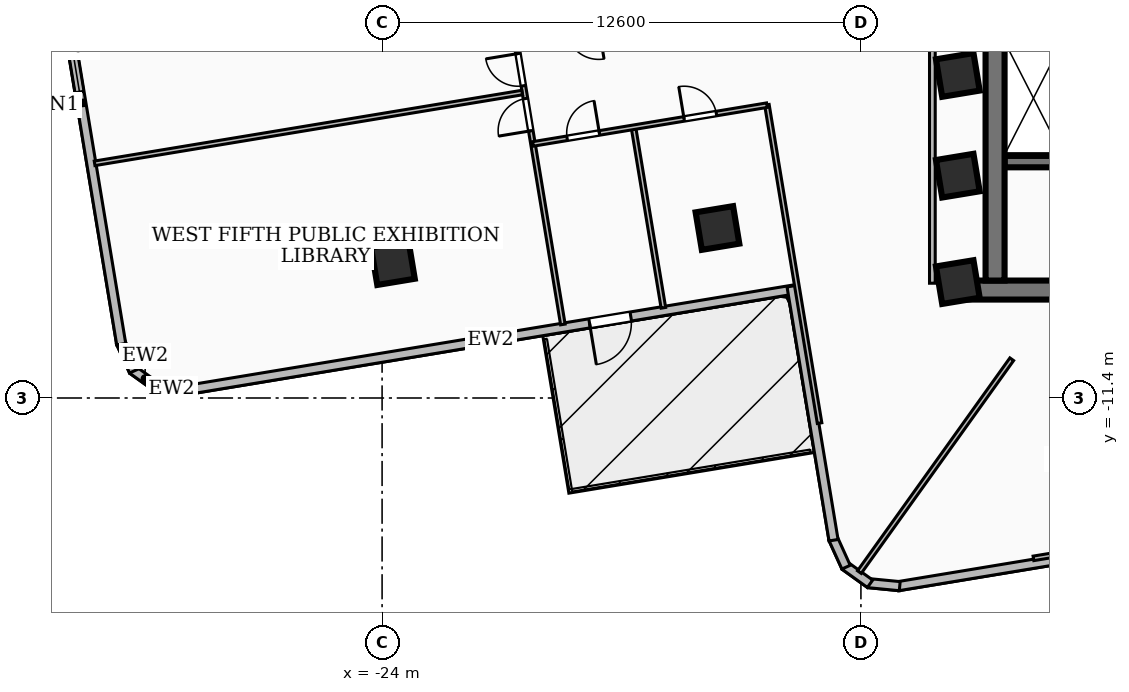
"""IFC4 building model, lengths in metres.
Left out: names, types, materials, properties, quantities, classifications, styles, units other than length and angle.
Written with IfcOpenShell. Run it as: python <this file> out.ifc"""

import sys

from ifc_helpers import new_model, si_unit, direction, frame, frame_2d, origin, origin_2d, place, context, subcontext, project, spatial, rectangle, extrude, element, fill, save


model = new_model("IFC4")
c1 = context("Model", 3, precision=1e-05, world=origin(), true_north=direction((0.0, 1.0)))
c2 = subcontext(c1, "Body", "Model", "MODEL_VIEW")
j1 = project(units=[si_unit("LENGTHUNIT", "METRE"), si_unit("PLANEANGLEUNIT", "RADIAN")], contexts=[c1])
p1 = place(None, origin())
s1 = spatial("IfcSite", under=j1, at=p1, CompositionType="ELEMENT")
p2 = place(p1, origin())
s2 = spatial("IfcBuilding", under=s1, at=p2, CompositionType="ELEMENT")
p3 = place(p2, frame((0.0, 0.0, 92.88)))
s3 = spatial("IfcBuildingStorey", under=s2, at=p3, CompositionType="ELEMENT", Elevation=92.88)
p4 = place(p3, frame((8.78, -8.56, 0.0), z_axis=(0.0, 0.0, 1.0), x_axis=(-1.0, 0.0, 0.0)))
e1 = element("IfcWall", 1, at=p4, inside=s3, PredefinedType="SHEAR", context=c2, shape_type="SweptSolid", body=[
    extrude(rectangle(XDim=17.56, YDim=0.5, at=frame_2d((8.78, 0.0))), origin(), (0.0, 0.0, 1.0), 3.34),
])
p5 = place(p3, frame((-7.87, -8.31, 0.0), z_axis=(0.0, 0.0, 1.0), x_axis=(0.0, 1.0, 0.0)))
e2 = element("IfcWall", 2, at=p5, inside=s3, PredefinedType="SHEAR", context=c2, shape_type="SweptSolid", body=[
    extrude(rectangle(XDim=6.31, YDim=0.5, at=frame_2d((3.155, 0.0))), origin(), (0.0, 0.0, 1.0), 3.34),
])
p6 = place(p3, frame((-7.62, -5.18, 0.0), z_axis=(0.0, 0.0, 1.0), x_axis=(1.0, 0.0, 0.0)))
e3 = element("IfcWall", 3, at=p6, inside=s3, PredefinedType="SOLIDWALL", context=c2, shape_type="SweptSolid", body=[
    extrude(rectangle(XDim=15.24, YDim=0.3, at=frame_2d((7.62, 0.0))), origin(), (0.0, 0.0, 1.0), 3.34),
])
p7 = place(p6, frame((5.77, 0.0, 0.0)))
e4 = element("IfcOpeningElement", 4, at=p7, cuts=e3, PredefinedType="OPENING", context=c2, shape_type="SweptSolid", body=[
    extrude(rectangle(XDim=1.1, YDim=2.15, at=frame_2d((0.55, 1.075))), frame((0.0, 0.16, 0.0), z_axis=(0.0, -1.0, 0.0), x_axis=(1.0, 0.0, 0.0)), (0.0, 0.0, 1.0), 0.32),
])
p8 = place(p6, frame((7.97, 0.0, 0.0)))
e5 = element("IfcOpeningElement", 5, at=p8, cuts=e3, PredefinedType="OPENING", context=c2, shape_type="SweptSolid", body=[
    extrude(rectangle(XDim=1.0, YDim=2.1, at=frame_2d((0.5, 1.05))), frame((0.0, 0.16, 0.0), z_axis=(0.0, -1.0, 0.0), x_axis=(1.0, 0.0, 0.0)), (0.0, 0.0, 1.0), 0.32),
])
for number, where, z_axis, x_axis in (
    (6, (-8.85, -5.55, 0.0), (0.0, 0.0, 1.0), (0.987, 0.163, 0.0)),
    (7, (-8.85, -2.9, 0.0), (0.0, 0.0, 1.0), (0.987, 0.163, 0.0)),
    (8, (-8.85, -8.35, 0.0), (0.0, 0.0, 1.0), (0.987, 0.163, 0.0)),
    (9, (-15.175, -6.927, 0.0), (0.0, 0.0, 1.0), (0.987, 0.163, 0.0)),
    (10, (-23.715, -7.851, 0.0), (0.0, 0.0, 1.0), (0.987, 0.163, 0.0)),
):
    element("IfcColumn", number, at=place(p3, frame(where, z_axis=z_axis, x_axis=x_axis)), inside=s3, PredefinedType="COLUMN", context=c2, shape_type="SweptSolid", body=[
        extrude(rectangle(XDim=1.0, YDim=1.0, at=origin_2d()), origin(), (0.0, 0.0, 1.0), 3.6),
    ])
p9 = place(p3, frame((-13.115, -8.537, 0.0), z_axis=(0.0, 0.0, 1.0), x_axis=(-0.986576548161, -0.163299463007, 0.0)))
e11 = element("IfcWall", 11, at=p9, inside=s3, PredefinedType="SOLIDWALL", context=c2, shape_type="SweptSolid", body=[
    extrude(rectangle(XDim=16.277, YDim=0.24, at=frame_2d((8.138, 0.0))), origin(), (0.0, 0.0, 1.0), 2.644),
])
p10 = place(p9, frame((4.4, 0.0, 0.0)))
e12 = element("IfcOpeningElement", 12, at=p10, cuts=e11, PredefinedType="OPENING", context=c2, shape_type="SweptSolid", body=[
    extrude(rectangle(XDim=1.1, YDim=2.1, at=frame_2d((0.55, 1.05))), frame((0.0, 0.13, 0.0), z_axis=(0.0, -1.0, 0.0), x_axis=(1.0, 0.0, 0.0)), (0.0, 0.0, 1.0), 0.26),
])
p11 = place(p3, frame((-29.123, -11.193, 0.0), z_axis=(0.0, 0.0, 1.0), x_axis=(-0.995332708541, 0.096502846113, 0.0)))
e13 = element("IfcWall", 13, at=p11, inside=s3, PredefinedType="SOLIDWALL", context=c2, shape_type="SweptSolid", body=[
    extrude(rectangle(XDim=0.83, YDim=0.24, at=frame_2d((0.415, 0.0))), origin(), (0.0, 0.0, 1.0), 3.34),
])
p12 = place(p3, frame((-29.904, -11.13, 0.0), z_axis=(0.0, 0.0, 1.0), x_axis=(-0.812516648433, 0.582937986427, 0.0)))
e14 = element("IfcWall", 14, at=p12, inside=s3, PredefinedType="SOLIDWALL", context=c2, shape_type="SweptSolid", body=[
    extrude(rectangle(XDim=0.815, YDim=0.24, at=frame_2d((0.407, 0.0))), origin(), (0.0, 0.0, 1.0), 3.34),
])
p13 = place(p3, frame((-30.536, -10.693, 0.0), z_axis=(0.0, 0.0, 1.0), x_axis=(-0.411720575173, 0.911310138196, 0.0)))
e15 = element("IfcWall", 15, at=p13, inside=s3, PredefinedType="SOLIDWALL", context=c2, shape_type="SweptSolid", body=[
    extrude(rectangle(XDim=0.831, YDim=0.24, at=frame_2d((0.416, 0.0))), origin(), (0.0, 0.0, 1.0), 3.34),
])
p14 = place(p3, frame((-30.864, -9.984, 0.0), z_axis=(0.0, 0.0, 1.0), x_axis=(-0.163307635867, 0.986575195344, 0.0)))
e16 = element("IfcWall", 16, at=p14, inside=s3, PredefinedType="SOLIDWALL", context=c2, shape_type="SweptSolid", body=[
    extrude(rectangle(XDim=10.158, YDim=0.24, at=frame_2d((5.079, 0.0))), origin(), (0.0, 0.0, 1.0), 3.34),
])
p15 = place(p14, frame((6.724, 0.0, 0.85)))
e17 = element("IfcOpeningElement", 17, at=p15, cuts=e16, PredefinedType="OPENING", context=c2, shape_type="SweptSolid", body=[
    extrude(rectangle(XDim=2.4, YDim=2.1, at=frame_2d((1.2, 1.05))), frame((0.0, 0.13, 0.0), z_axis=(0.0, -1.0, 0.0), x_axis=(1.0, 0.0, 0.0)), (0.0, 0.0, 1.0), 0.26),
])
p16 = place(p3, frame((-4.276, -15.335, 0.0), z_axis=(0.0, 0.0, 1.0), x_axis=(-0.986586851863, -0.16323720082, 0.0)))
e18 = element("IfcWall", 18, at=p16, inside=s3, PredefinedType="SOLIDWALL", context=c2, shape_type="SweptSolid", body=[
    extrude(rectangle(XDim=6.237, YDim=0.24, at=frame_2d((3.118, 0.0))), origin(), (0.0, 0.0, 1.0), 2.486),
])
p17 = place(p3, frame((-10.379, -16.351, 0.0), z_axis=(0.0, 0.0, 1.0), x_axis=(-0.995335447313, 0.096474594184, 0.0)))
e19 = element("IfcWall", 19, at=p17, inside=s3, PredefinedType="SOLIDWALL", context=c2, shape_type="SweptSolid", body=[
    extrude(rectangle(XDim=0.83, YDim=0.24, at=frame_2d((0.415, 0.0))), origin(), (0.0, 0.0, 1.0), 3.34),
])
p18 = place(p3, frame((-11.16, -16.288, 0.0), z_axis=(0.0, 0.0, 1.0), x_axis=(-0.812068662375, 0.583561896965, 0.0)))
e20 = element("IfcWall", 20, at=p18, inside=s3, PredefinedType="SOLIDWALL", context=c2, shape_type="SweptSolid", body=[
    extrude(rectangle(XDim=0.814, YDim=0.24, at=frame_2d((0.407, 0.0))), origin(), (0.0, 0.0, 1.0), 3.34),
])
p19 = place(p3, frame((-11.791, -15.851, 0.0), z_axis=(0.0, 0.0, 1.0), x_axis=(-0.412696106872, 0.910868773958, 0.0)))
e21 = element("IfcWall", 21, at=p19, inside=s3, PredefinedType="SOLIDWALL", context=c2, shape_type="SweptSolid", body=[
    extrude(rectangle(XDim=0.831, YDim=0.24, at=frame_2d((0.416, 0.0))), origin(), (0.0, 0.0, 1.0), 3.34),
])
p20 = place(p3, frame((-12.12, -15.142, 0.0), z_axis=(0.0, 0.0, 1.0), x_axis=(-0.163241835244, 0.986586085056, 0.0)))
e22 = element("IfcWall", 22, at=p20, inside=s3, PredefinedType="SOLIDWALL", context=c2, shape_type="SweptSolid", body=[
    extrude(rectangle(XDim=6.775, YDim=0.24, at=frame_2d((3.387, 0.0))), origin(), (0.0, 0.0, 1.0), 2.644),
])
p21 = place(p3, frame((-9.52, -8.38, 0.0), z_axis=(0.0, 0.0, 1.0), x_axis=(0.0, 1.0, 0.0)))
e23 = element("IfcWall", 23, at=p21, inside=s3, PredefinedType="PARTITIONING", context=c2, shape_type="SweptSolid", body=[
    extrude(rectangle(XDim=6.63, YDim=0.15, at=frame_2d((3.315, 0.0))), origin(), (0.0, 0.0, 1.0), 2.486),
])
p22 = place(p3, frame((-7.431, -10.38, 0.0), z_axis=(0.0, 0.0, 1.0), x_axis=(-0.582126278944, -0.813098392178, 0.0)))
e24 = element("IfcWall", 24, at=p22, inside=s3, PredefinedType="PARTITIONING", context=c2, shape_type="SweptSolid", body=[
    extrude(rectangle(XDim=6.889, YDim=0.12, at=frame_2d((3.444, 0.0))), origin(), (0.0, 0.0, 1.0), 2.486),
])
p23 = place(p3, frame((-13.874, -3.686, 0.0), z_axis=(0.0, 0.0, 1.0), x_axis=(0.163270245909, -0.98658138377, 0.0)))
e25 = element("IfcWall", 25, at=p23, inside=s3, PredefinedType="PARTITIONING", context=c2, shape_type="SweptSolid", body=[
    extrude(rectangle(XDim=8.489, YDim=0.12, at=frame_2d((4.245, 0.0))), origin(), (0.0, 0.0, 1.0), 2.486),
])
p24 = place(p3, frame((-17.382, -4.297, 0.0), z_axis=(0.0, 0.0, 1.0), x_axis=(0.163556674632, -0.986533939702, 0.0)))
e26 = element("IfcWall", 26, at=p24, inside=s3, PredefinedType="PARTITIONING", context=c2, shape_type="SweptSolid", body=[
    extrude(rectangle(XDim=4.794, YDim=0.12, at=frame_2d((2.397, 0.0))), origin(), (0.0, 0.0, 1.0), 2.486),
])
p25 = place(p3, frame((-20.029, -4.715, 0.0), z_axis=(0.0, 0.0, 1.0), x_axis=(0.986548927366, 0.163466247017, 0.0)))
e27 = element("IfcWall", 27, at=p25, inside=s3, PredefinedType="PARTITIONING", context=c2, shape_type="SweptSolid", body=[
    extrude(rectangle(XDim=6.24, YDim=0.12, at=frame_2d((3.12, 0.0))), origin(), (0.0, 0.0, 1.0), 3.34),
])
p26 = place(p25, frame((4.03, 0.0, 0.0)))
e28 = element("IfcOpeningElement", 28, at=p26, cuts=e27, PredefinedType="OPENING", context=c2, shape_type="SweptSolid", body=[
    extrude(rectangle(XDim=0.86, YDim=2.04, at=frame_2d((0.43, 1.02))), frame((0.0, 0.07, 0.0), z_axis=(0.0, -1.0, 0.0), x_axis=(1.0, 0.0, 0.0)), (0.0, 0.0, 1.0), 0.14),
])
p27 = place(p25, frame((0.91, 0.0, 0.0)))
e29 = element("IfcOpeningElement", 29, at=p27, cuts=e27, PredefinedType="OPENING", context=c2, shape_type="SweptSolid", body=[
    extrude(rectangle(XDim=0.86, YDim=2.04, at=frame_2d((0.43, 1.02))), frame((0.0, 0.07, 0.0), z_axis=(0.0, -1.0, 0.0), x_axis=(1.0, 0.0, 0.0)), (0.0, 0.0, 1.0), 0.14),
])
p28 = place(p3, frame((-20.314, -3.363, 0.0), z_axis=(0.0, 0.0, 1.0), x_axis=(-0.986565802435, -0.163364370245, 0.0)))
e30 = element("IfcWall", 30, at=p28, inside=s3, PredefinedType="PARTITIONING", context=c2, shape_type="SweptSolid", body=[
    extrude(rectangle(XDim=11.404, YDim=0.12, at=frame_2d((5.702, 0.0))), origin(), (0.0, 0.0, 1.0), 2.832),
])
p29 = place(p3, frame((-19.243, -9.465, 0.0), z_axis=(0.0, 0.0, 1.0), x_axis=(-0.163348643691, 0.98656840645, 0.0)))
e31 = element("IfcWall", 31, at=p29, inside=s3, PredefinedType="PARTITIONING", context=c2, shape_type="SweptSolid", body=[
    extrude(rectangle(XDim=12.93, YDim=0.12, at=frame_2d((6.465, 0.0))), origin(), (0.0, 0.0, 1.0), 2.486),
])
p30 = place(p29, frame((6.365, 0.0, 0.0)))
e32 = element("IfcOpeningElement", 32, at=p30, cuts=e31, PredefinedType="OPENING", context=c2, shape_type="SweptSolid", body=[
    extrude(rectangle(XDim=0.86, YDim=2.04, at=frame_2d((0.43, 1.02))), frame((0.0, 0.07, 0.0), z_axis=(0.0, -1.0, 0.0), x_axis=(1.0, 0.0, 0.0)), (0.0, 0.0, 1.0), 0.14),
])
p31 = place(p29, frame((5.165, 0.0, 0.0)))
e33 = element("IfcOpeningElement", 33, at=p31, cuts=e31, PredefinedType="OPENING", context=c2, shape_type="SweptSolid", body=[
    extrude(rectangle(XDim=0.86, YDim=2.04, at=frame_2d((0.43, 1.02))), frame((0.0, 0.07, 0.0), z_axis=(0.0, -1.0, 0.0), x_axis=(1.0, 0.0, 0.0)), (0.0, 0.0, 1.0), 0.14),
])
p32 = place(p3, frame((-6.86, -15.62, 0.0), z_axis=(0.0, 0.0, 1.0), x_axis=(0.986575116384, 0.16330811288, 0.0)))
e34 = element("IfcWall", 34, at=p32, inside=s3, PredefinedType="PARTITIONING", context=c2, shape_type="SweptSolid", body=[
    extrude(rectangle(XDim=7.949, YDim=0.12, at=frame_2d((3.974, 0.0))), origin(), (0.0, 0.0, 1.0), 2.486),
])
p33 = place(p10, origin())
e35 = element("IfcDoor", 35, at=p33, inside=s3, OperationType="SINGLE_SWING_RIGHT", PredefinedType="DOOR", context=c2, shape_type="SweptSolid", body=[
    extrude(rectangle(XDim=1.1, YDim=2.1, at=frame_2d((0.55, 1.05))), frame((0.0, 0.025, 0.0), z_axis=(0.0, -1.0, 0.0), x_axis=(1.0, 0.0, 0.0)), (0.0, 0.0, 1.0), 0.05),
])
fill(e12, e35)
p34 = place(p15, origin())
e36 = element("IfcWindow", 36, at=p34, inside=s3, PartitioningType="SINGLE_PANEL", PredefinedType="WINDOW", context=c2, shape_type="SweptSolid", body=[
    extrude(rectangle(XDim=2.4, YDim=2.1, at=frame_2d((1.2, 1.05))), frame((0.0, 0.03, 0.0), z_axis=(0.0, -1.0, 0.0), x_axis=(1.0, 0.0, 0.0)), (0.0, 0.0, 1.0), 0.06),
])
fill(e17, e36)
p35 = place(p26, origin())
e37 = element("IfcDoor", 37, at=p35, inside=s3, OperationType="SINGLE_SWING_LEFT", PredefinedType="DOOR", context=c2, shape_type="SweptSolid", body=[
    extrude(rectangle(XDim=0.86, YDim=2.04, at=frame_2d((0.43, 1.02))), frame((0.0, 0.025, 0.0), z_axis=(0.0, -1.0, 0.0), x_axis=(1.0, 0.0, 0.0)), (0.0, 0.0, 1.0), 0.05),
])
fill(e28, e37)
p36 = place(p27, origin())
e38 = element("IfcDoor", 38, at=p36, inside=s3, OperationType="SINGLE_SWING_RIGHT", PredefinedType="DOOR", context=c2, shape_type="SweptSolid", body=[
    extrude(rectangle(XDim=0.86, YDim=2.04, at=frame_2d((0.43, 1.02))), frame((0.0, 0.025, 0.0), z_axis=(0.0, -1.0, 0.0), x_axis=(1.0, 0.0, 0.0)), (0.0, 0.0, 1.0), 0.05),
])
fill(e29, e38)
p37 = place(p30, origin())
e39 = element("IfcDoor", 39, at=p37, inside=s3, OperationType="SINGLE_SWING_RIGHT", PredefinedType="DOOR", context=c2, shape_type="SweptSolid", body=[
    extrude(rectangle(XDim=0.86, YDim=2.04, at=frame_2d((0.43, 1.02))), frame((0.0, 0.025, 0.0), z_axis=(0.0, -1.0, 0.0), x_axis=(1.0, 0.0, 0.0)), (0.0, 0.0, 1.0), 0.05),
])
fill(e32, e39)
p38 = place(p31, origin())
e40 = element("IfcDoor", 40, at=p38, inside=s3, OperationType="SINGLE_SWING_LEFT", PredefinedType="DOOR", context=c2, shape_type="SweptSolid", body=[
    extrude(rectangle(XDim=0.86, YDim=2.04, at=frame_2d((0.43, 1.02))), frame((0.0, 0.025, 0.0), z_axis=(0.0, -1.0, 0.0), x_axis=(1.0, 0.0, 0.0)), (0.0, 0.0, 1.0), 0.05),
])
fill(e33, e40)
save(model, sys.argv[1])
